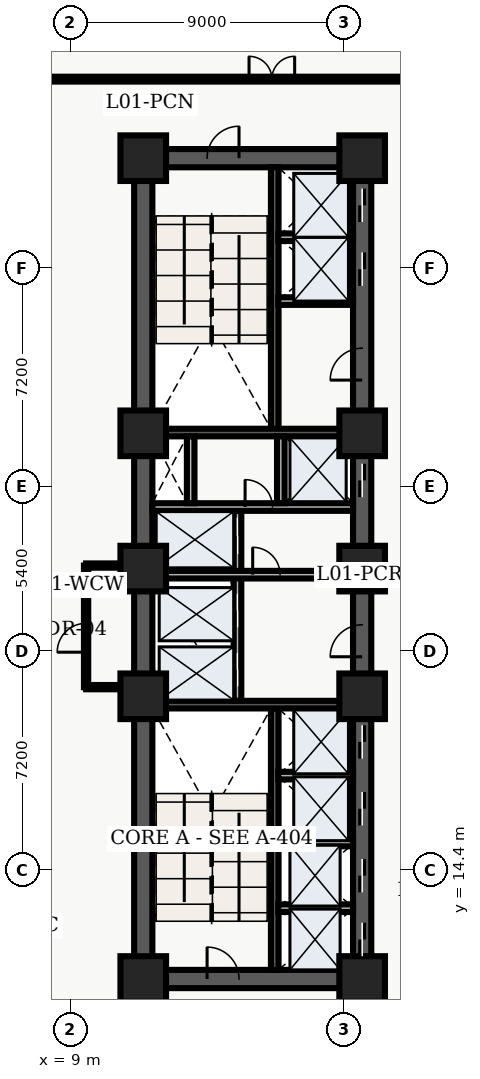
"""IFC4 building model, lengths in metres.
Left out: names, types, materials, properties, quantities, classifications, styles, units other than length and angle.
Written with IfcOpenShell. Run it as: python <this file> out.ifc"""

import sys

from ifc_helpers import new_model, entity, si_unit, converted_unit, direction, frame, origin_with_axes, origin_2d_with_axis, place, context, subcontext, project, spatial, polyline, rectangle, outline, extrude, element, fill, save


model = new_model("IFC4")
c1 = context("Model", 3, precision=1e-05, world=origin_with_axes(), true_north=direction((0.0, 1.0)))
c2 = subcontext(c1, "Body", "Model", "MODEL_VIEW")
j1 = project(units=[si_unit("LENGTHUNIT", "METRE"), converted_unit("PLANEANGLEUNIT", "DEGREE", entity("IfcPlaneAngleMeasure", 0.017), si_unit("PLANEANGLEUNIT", "RADIAN"), dimensions=[0, 0, 0, 0, 0, 0, 0])], contexts=[c1])
p1 = place(None, origin_with_axes())
s1 = spatial("IfcSite", under=j1, at=p1, CompositionType="ELEMENT")
p2 = place(p1, origin_with_axes())
s2 = spatial("IfcBuilding", under=s1, at=p2, CompositionType="ELEMENT")
p3 = place(p2, frame((0.0, 0.0, 5.7), z_axis=(0.0, 0.0, 1.0), x_axis=(1.0, 0.0, 0.0)))
s3 = spatial("IfcBuildingStorey", under=s2, at=p3, CompositionType="ELEMENT", Elevation=5.7)
p4 = place(p3, frame((11.4, 10.8, 0.0), z_axis=(0.0, 0.0, 1.0), x_axis=(0.0, 1.0, 0.0)))
e1 = element("IfcWall", 1, at=p4, inside=s3, PredefinedType="SHEAR", context=c2, shape_type="SweptSolid", body=[
    extrude(outline(polyline([(0.0, -0.3), (27.0, -0.3), (27.0, 0.3), (0.0, 0.3), (0.0, -0.3)])), origin_with_axes(), (0.0, 0.0, 1.0), 4.86),
])
p5 = place(p3, frame((11.4, 10.8, 0.0), z_axis=(0.0, 0.0, 1.0), x_axis=(1.0, 0.0, 0.0)))
e2 = element("IfcWall", 2, at=p5, inside=s3, PredefinedType="SHEAR", context=c2, shape_type="SweptSolid", body=[
    extrude(outline(polyline([(0.0, -0.3), (7.2, -0.3), (7.2, 0.3), (0.0, 0.3), (0.0, -0.3)])), origin_with_axes(), (0.0, 0.0, 1.0), 4.86),
])
p6 = place(p5, frame((2.625, 0.0, 0.0), z_axis=(0.0, 0.0, 1.0), x_axis=(1.0, 0.0, 0.0)))
e3 = element("IfcOpeningElement", 3, at=p6, cuts=e2, PredefinedType="OPENING", context=c2, shape_type="SweptSolid", body=[
    extrude(rectangle(XDim=1.05, YDim=0.62, at=origin_2d_with_axis()), origin_with_axes(), (0.0, 0.0, 1.0), 2.15),
])
p7 = place(p3, frame((11.4, 37.8, 0.0), z_axis=(0.0, 0.0, 1.0), x_axis=(1.0, 0.0, 0.0)))
e4 = element("IfcWall", 4, at=p7, inside=s3, PredefinedType="SHEAR", context=c2, shape_type="SweptSolid", body=[
    extrude(outline(polyline([(0.0, -0.3), (7.2, -0.3), (7.2, 0.3), (0.0, 0.3), (0.0, -0.3)])), origin_with_axes(), (0.0, 0.0, 1.0), 4.86),
])
p8 = place(p7, frame((2.625, 0.0, 0.0), z_axis=(0.0, 0.0, 1.0), x_axis=(1.0, 0.0, 0.0)))
e5 = element("IfcOpeningElement", 5, at=p8, cuts=e4, PredefinedType="OPENING", context=c2, shape_type="SweptSolid", body=[
    extrude(rectangle(XDim=1.05, YDim=0.62, at=origin_2d_with_axis()), origin_with_axes(), (0.0, 0.0, 1.0), 2.15),
])
p9 = place(p3, frame((18.6, 10.8, 0.0), z_axis=(0.0, 0.0, 1.0), x_axis=(0.0, 1.0, 0.0)))
e6 = element("IfcWall", 6, at=p9, inside=s3, PredefinedType="SHEAR", context=c2, shape_type="SweptSolid", body=[
    extrude(outline(polyline([(0.0, -0.3), (13.5, -0.3), (13.5, 0.3), (0.0, 0.3), (0.0, -0.3)])), origin_with_axes(), (0.0, 0.0, 1.0), 4.86),
])
p10 = place(p9, frame((1.3, 0.0, 0.0), z_axis=(0.0, 0.0, 1.0), x_axis=(1.0, 0.0, 0.0)))
e7 = element("IfcOpeningElement", 7, at=p10, cuts=e6, PredefinedType="OPENING", context=c2, shape_type="SweptSolid", body=[
    extrude(rectangle(XDim=1.1, YDim=0.62, at=origin_2d_with_axis()), origin_with_axes(), (0.0, 0.0, 1.0), 2.15),
])
p11 = place(p9, frame((3.4, 0.0, 0.0), z_axis=(0.0, 0.0, 1.0), x_axis=(1.0, 0.0, 0.0)))
e8 = element("IfcOpeningElement", 8, at=p11, cuts=e6, PredefinedType="OPENING", context=c2, shape_type="SweptSolid", body=[
    extrude(rectangle(XDim=1.1, YDim=0.62, at=origin_2d_with_axis()), origin_with_axes(), (0.0, 0.0, 1.0), 2.15),
])
p12 = place(p9, frame((5.6, 0.0, 0.0), z_axis=(0.0, 0.0, 1.0), x_axis=(1.0, 0.0, 0.0)))
e9 = element("IfcOpeningElement", 9, at=p12, cuts=e6, PredefinedType="OPENING", context=c2, shape_type="SweptSolid", body=[
    extrude(rectangle(XDim=1.1, YDim=0.62, at=origin_2d_with_axis()), origin_with_axes(), (0.0, 0.0, 1.0), 2.15),
])
p13 = place(p9, frame((7.8, 0.0, 0.0), z_axis=(0.0, 0.0, 1.0), x_axis=(1.0, 0.0, 0.0)))
e10 = element("IfcOpeningElement", 10, at=p13, cuts=e6, PredefinedType="OPENING", context=c2, shape_type="SweptSolid", body=[
    extrude(rectangle(XDim=1.1, YDim=0.62, at=origin_2d_with_axis()), origin_with_axes(), (0.0, 0.0, 1.0), 2.15),
])
p14 = place(p9, frame((11.125, 0.0, 0.0), z_axis=(0.0, 0.0, 1.0), x_axis=(1.0, 0.0, 0.0)))
e11 = element("IfcOpeningElement", 11, at=p14, cuts=e6, PredefinedType="OPENING", context=c2, shape_type="SweptSolid", body=[
    extrude(rectangle(XDim=1.05, YDim=0.62, at=origin_2d_with_axis()), origin_with_axes(), (0.0, 0.0, 1.0), 2.15),
])
p15 = place(p3, frame((18.6, 24.3, 0.0), z_axis=(0.0, 0.0, 1.0), x_axis=(0.0, 1.0, 0.0)))
e12 = element("IfcWall", 12, at=p15, inside=s3, PredefinedType="SHEAR", context=c2, shape_type="SweptSolid", body=[
    extrude(outline(polyline([(0.0, -0.3), (13.5, -0.3), (13.5, 0.3), (0.0, 0.3), (0.0, -0.3)])), origin_with_axes(), (0.0, 0.0, 1.0), 4.86),
])
p16 = place(p15, frame((9.85, 0.0, 0.0), z_axis=(0.0, 0.0, 1.0), x_axis=(1.0, 0.0, 0.0)))
e13 = element("IfcOpeningElement", 13, at=p16, cuts=e12, PredefinedType="OPENING", context=c2, shape_type="SweptSolid", body=[
    extrude(rectangle(XDim=1.1, YDim=0.62, at=origin_2d_with_axis()), origin_with_axes(), (0.0, 0.0, 1.0), 2.15),
])
p17 = place(p15, frame((11.95, 0.0, 0.0), z_axis=(0.0, 0.0, 1.0), x_axis=(1.0, 0.0, 0.0)))
e14 = element("IfcOpeningElement", 14, at=p17, cuts=e12, PredefinedType="OPENING", context=c2, shape_type="SweptSolid", body=[
    extrude(rectangle(XDim=1.1, YDim=0.62, at=origin_2d_with_axis()), origin_with_axes(), (0.0, 0.0, 1.0), 2.15),
])
p18 = place(p15, frame((2.9, 0.0, 0.0), z_axis=(0.0, 0.0, 1.0), x_axis=(1.0, 0.0, 0.0)))
e15 = element("IfcOpeningElement", 15, at=p18, cuts=e12, PredefinedType="OPENING", context=c2, shape_type="SweptSolid", body=[
    extrude(rectangle(XDim=1.1, YDim=0.62, at=origin_2d_with_axis()), origin_with_axes(), (0.0, 0.0, 1.0), 2.15),
])
p19 = place(p15, frame((6.725, 0.0, 0.0), z_axis=(0.0, 0.0, 1.0), x_axis=(1.0, 0.0, 0.0)))
e16 = element("IfcOpeningElement", 16, at=p19, cuts=e12, PredefinedType="OPENING", context=c2, shape_type="SweptSolid", body=[
    extrude(rectangle(XDim=1.05, YDim=0.62, at=origin_2d_with_axis()), origin_with_axes(), (0.0, 0.0, 1.0), 2.15),
])
p20 = place(p3, frame((15.725, 11.1, 0.0), z_axis=(0.0, 0.0, 1.0), x_axis=(0.0, 1.0, 0.0)))
e17 = element("IfcWall", 17, at=p20, inside=s3, PredefinedType="SHEAR", context=c2, shape_type="SweptSolid", body=[
    extrude(outline(polyline([(0.0, -0.125), (8.6, -0.125), (8.6, 0.125), (0.0, 0.125), (0.0, -0.125)])), origin_with_axes(), (0.0, 0.0, 1.0), 4.86),
])
p21 = place(p3, frame((11.7, 19.825, 0.0), z_axis=(0.0, 0.0, 1.0), x_axis=(1.0, 0.0, 0.0)))
e18 = element("IfcWall", 18, at=p21, inside=s3, PredefinedType="SHEAR", context=c2, shape_type="SweptSolid", body=[
    extrude(outline(polyline([(0.0, -0.125), (6.6, -0.125), (6.6, 0.125), (0.0, 0.125), (0.0, -0.125)])), origin_with_axes(), (0.0, 0.0, 1.0), 4.86),
])
p22 = place(p3, frame((15.725, 28.9, 0.0), z_axis=(0.0, 0.0, 1.0), x_axis=(0.0, 1.0, 0.0)))
e19 = element("IfcWall", 19, at=p22, inside=s3, PredefinedType="SHEAR", context=c2, shape_type="SweptSolid", body=[
    extrude(outline(polyline([(0.0, -0.125), (8.6, -0.125), (8.6, 0.125), (0.0, 0.125), (0.0, -0.125)])), origin_with_axes(), (0.0, 0.0, 1.0), 4.86),
])
p23 = place(p3, frame((11.7, 28.775, 0.0), z_axis=(0.0, 0.0, 1.0), x_axis=(1.0, 0.0, 0.0)))
e20 = element("IfcWall", 20, at=p23, inside=s3, PredefinedType="SHEAR", context=c2, shape_type="SweptSolid", body=[
    extrude(outline(polyline([(0.0, -0.125), (6.6, -0.125), (6.6, 0.125), (0.0, 0.125), (0.0, -0.125)])), origin_with_axes(), (0.0, 0.0, 1.0), 4.86),
])
p24 = place(p3, frame((14.5, 19.95, 0.0), z_axis=(0.0, 0.0, 1.0), x_axis=(0.0, 1.0, 0.0)))
e21 = element("IfcWall", 21, at=p24, inside=s3, PredefinedType="SOLIDWALL", context=c2, shape_type="SweptSolid", body=[
    extrude(outline(polyline([(0.0, -0.125), (6.25, -0.125), (6.25, 0.125), (0.0, 0.125), (0.0, -0.125)])), origin_with_axes(), (0.0, 0.0, 1.0), 3.6),
])
p25 = place(p24, frame((1.025, 0.0, 0.0), z_axis=(0.0, 0.0, 1.0), x_axis=(1.0, 0.0, 0.0)))
e22 = element("IfcOpeningElement", 22, at=p25, cuts=e21, PredefinedType="OPENING", context=c2, shape_type="SweptSolid", body=[
    extrude(rectangle(XDim=1.1, YDim=0.27, at=origin_2d_with_axis()), origin_with_axes(), (0.0, 0.0, 1.0), 2.15),
])
p26 = place(p24, frame((2.975, 0.0, 0.0), z_axis=(0.0, 0.0, 1.0), x_axis=(1.0, 0.0, 0.0)))
e23 = element("IfcOpeningElement", 23, at=p26, cuts=e21, PredefinedType="OPENING", context=c2, shape_type="SweptSolid", body=[
    extrude(rectangle(XDim=1.1, YDim=0.27, at=origin_2d_with_axis()), origin_with_axes(), (0.0, 0.0, 1.0), 2.15),
])
p27 = place(p24, frame((5.425, 0.0, 0.0), z_axis=(0.0, 0.0, 1.0), x_axis=(1.0, 0.0, 0.0)))
e24 = element("IfcOpeningElement", 24, at=p27, cuts=e21, PredefinedType="OPENING", context=c2, shape_type="SweptSolid", body=[
    extrude(rectangle(XDim=1.2, YDim=0.27, at=origin_2d_with_axis()), origin_with_axes(), (0.0, 0.0, 1.0), 2.15),
])
p28 = place(p3, frame((11.7, 24.1, 0.0), z_axis=(0.0, 0.0, 1.0), x_axis=(1.0, 0.0, 0.0)))
e25 = element("IfcWall", 25, at=p28, inside=s3, PredefinedType="SOLIDWALL", context=c2, shape_type="SweptSolid", body=[
    extrude(outline(polyline([(0.0, -0.125), (6.6, -0.125), (6.6, 0.125), (0.0, 0.125), (0.0, -0.125)])), origin_with_axes(), (0.0, 0.0, 1.0), 3.6),
])
p29 = place(p28, frame((3.75, 0.0, 0.0), z_axis=(0.0, 0.0, 1.0), x_axis=(1.0, 0.0, 0.0)))
e26 = element("IfcOpeningElement", 26, at=p29, cuts=e25, PredefinedType="OPENING", context=c2, shape_type="SweptSolid", body=[
    extrude(rectangle(XDim=0.9, YDim=0.27, at=origin_2d_with_axis()), origin_with_axes(), (0.0, 0.0, 1.0), 2.15),
])
p30 = place(p3, frame((11.7, 26.325, 0.0), z_axis=(0.0, 0.0, 1.0), x_axis=(1.0, 0.0, 0.0)))
e27 = element("IfcWall", 27, at=p30, inside=s3, PredefinedType="SOLIDWALL", context=c2, shape_type="SweptSolid", body=[
    extrude(outline(polyline([(0.0, -0.125), (6.6, -0.125), (6.6, 0.125), (0.0, 0.125), (0.0, -0.125)])), origin_with_axes(), (0.0, 0.0, 1.0), 3.6),
])
p31 = place(p30, frame((3.5, 0.0, 0.0), z_axis=(0.0, 0.0, 1.0), x_axis=(1.0, 0.0, 0.0)))
e28 = element("IfcOpeningElement", 28, at=p31, cuts=e27, PredefinedType="OPENING", context=c2, shape_type="SweptSolid", body=[
    extrude(rectangle(XDim=0.9, YDim=0.27, at=origin_2d_with_axis()), origin_with_axes(), (0.0, 0.0, 1.0), 2.15),
])
for number, where, z_axis, x_axis in (
    (29, (12.96, 26.45, 0.0), (0.0, 0.0, 1.0), (0.0, 1.0, 0.0)),
    (30, (15.925, 26.45, 0.0), (0.0, 0.0, 1.0), (0.0, 1.0, 0.0)),
):
    element("IfcWall", number, at=place(p3, frame(where, z_axis=z_axis, x_axis=x_axis)), inside=s3, PredefinedType="SOLIDWALL", context=c2, shape_type="SweptSolid", body=[
        extrude(outline(polyline([(0.0, -0.125), (2.2, -0.125), (2.2, 0.125), (0.0, 0.125), (0.0, -0.125)])), origin_with_axes(), (0.0, 0.0, 1.0), 3.6),
    ])
for number, where, z_axis, x_axis in (
    (31, (11.4, 10.8, 0.0), (0.0, 0.0, 1.0), (1.0, 0.0, 0.0)),
    (32, (11.4, 20.1, 0.0), (0.0, 0.0, 1.0), (1.0, 0.0, 0.0)),
    (33, (11.4, 24.3, 0.0), (0.0, 0.0, 1.0), (1.0, 0.0, 0.0)),
    (34, (11.4, 28.75, 0.0), (0.0, 0.0, 1.0), (1.0, 0.0, 0.0)),
    (35, (11.4, 37.8, 0.0), (0.0, 0.0, 1.0), (1.0, 0.0, 0.0)),
    (36, (18.6, 10.8, 0.0), (0.0, 0.0, 1.0), (1.0, 0.0, 0.0)),
    (37, (18.6, 20.1, 0.0), (0.0, 0.0, 1.0), (1.0, 0.0, 0.0)),
    (38, (18.6, 24.3, 0.0), (0.0, 0.0, 1.0), (1.0, 0.0, 0.0)),
    (39, (18.6, 28.75, 0.0), (0.0, 0.0, 1.0), (1.0, 0.0, 0.0)),
    (40, (18.6, 37.8, 0.0), (0.0, 0.0, 1.0), (1.0, 0.0, 0.0)),
):
    element("IfcColumn", number, at=place(p3, frame(where, z_axis=z_axis, x_axis=x_axis)), inside=s3, PredefinedType="COLUMN", context=c2, shape_type="SweptSolid", body=[
        extrude(rectangle(XDim=1.5, YDim=1.5, at=origin_2d_with_axis()), origin_with_axes(), (0.0, 0.0, 1.0), 5.1),
    ])
for number, where, z_axis, x_axis in (
    (41, (15.84, 13.13, 0.0), (0.0, 0.0, 1.0), (1.0, 0.0, 0.0)),
    (42, (15.84, 15.29, 0.0), (0.0, 0.0, 1.0), (1.0, 0.0, 0.0)),
    (43, (15.84, 17.49, 0.0), (0.0, 0.0, 1.0), (1.0, 0.0, 0.0)),
    (44, (15.84, 33.1, 0.0), (0.0, 0.0, 1.0), (1.0, 0.0, 0.0)),
    (45, (15.84, 35.2, 0.0), (0.0, 0.0, 1.0), (1.0, 0.0, 0.0)),
):
    element("IfcWall", number, at=place(p3, frame(where, z_axis=z_axis, x_axis=x_axis)), inside=s3, PredefinedType="SOLIDWALL", context=c2, shape_type="SweptSolid", body=[
        extrude(outline(polyline([(0.0, -0.125), (2.46, -0.125), (2.46, 0.125), (0.0, 0.125), (0.0, -0.125)])), origin_with_axes(), (0.0, 0.0, 1.0), 3.2),
    ])
p32 = place(p3, frame((9.52, 20.4, 0.0), z_axis=(0.0, 0.0, 1.0), x_axis=(0.0, 1.0, 0.0)))
e46 = element("IfcWall", 46, at=p32, inside=s3, PredefinedType="PARTITIONING", context=c2, shape_type="SweptSolid", body=[
    extrude(outline(polyline([(0.0, -0.07), (4.0, -0.07), (4.0, 0.07), (0.0, 0.07), (0.0, -0.07)])), origin_with_axes(), (0.0, 0.0, 1.0), 3.2),
])
p33 = place(p32, frame((1.625, 0.0, 0.0), z_axis=(0.0, 0.0, 1.0), x_axis=(1.0, 0.0, 0.0)))
e47 = element("IfcOpeningElement", 47, at=p33, cuts=e46, PredefinedType="OPENING", context=c2, shape_type="SweptSolid", body=[
    extrude(rectangle(XDim=0.95, YDim=0.16, at=origin_2d_with_axis()), origin_with_axes(), (0.0, 0.0, 1.0), 2.15),
])
for number, where, z_axis, x_axis in (
    (48, (9.52, 20.4, 0.0), (0.0, 0.0, 1.0), (1.0, 0.0, 0.0)),
    (49, (9.52, 24.4, 0.0), (0.0, 0.0, 1.0), (1.0, 0.0, 0.0)),
):
    element("IfcWall", number, at=place(p3, frame(where, z_axis=z_axis, x_axis=x_axis)), inside=s3, PredefinedType="PARTITIONING", context=c2, shape_type="SweptSolid", body=[
        extrude(outline(polyline([(0.0, -0.07), (1.58, -0.07), (1.58, 0.07), (0.0, 0.07), (0.0, -0.07)])), origin_with_axes(), (0.0, 0.0, 1.0), 3.2),
    ])
p34 = place(p3, frame((0.38, 40.4, 0.0), z_axis=(0.0, 0.0, 1.0), x_axis=(1.0, 0.0, 0.0)))
e50 = element("IfcWall", 50, at=p34, inside=s3, PredefinedType="PARTITIONING", context=c2, shape_type="SweptSolid", body=[
    extrude(outline(polyline([(0.0, -0.08), (20.92, -0.08), (20.92, 0.08), (0.0, 0.08), (0.0, -0.08)])), origin_with_axes(), (0.0, 0.0, 1.0), 3.2),
])
p35 = place(p34, frame((15.25, 0.0, 0.0), z_axis=(0.0, 0.0, 1.0), x_axis=(1.0, 0.0, 0.0)))
e51 = element("IfcOpeningElement", 51, at=p35, cuts=e50, PredefinedType="OPENING", context=c2, shape_type="SweptSolid", body=[
    extrude(rectangle(XDim=1.5, YDim=0.18, at=origin_2d_with_axis()), origin_with_axes(), (0.0, 0.0, 1.0), 2.2),
])
p36 = place(p9, frame((1.3, 0.0, 0.0), z_axis=(0.0, 0.0, 1.0), x_axis=(1.0, 0.0, 0.0)))
e52 = element("IfcDoor", 52, at=p36, inside=s3, OperationType="SLIDING_TO_LEFT", PredefinedType="DOOR", context=c2, shape_type="SweptSolid", body=[
    extrude(rectangle(XDim=1.1, YDim=0.09, at=origin_2d_with_axis()), origin_with_axes(), (0.0, 0.0, 1.0), 2.15),
])
fill(e7, e52)
p37 = place(p9, frame((3.4, 0.0, 0.0), z_axis=(0.0, 0.0, 1.0), x_axis=(1.0, 0.0, 0.0)))
e53 = element("IfcDoor", 53, at=p37, inside=s3, OperationType="SLIDING_TO_RIGHT", PredefinedType="DOOR", context=c2, shape_type="SweptSolid", body=[
    extrude(rectangle(XDim=1.1, YDim=0.09, at=origin_2d_with_axis()), origin_with_axes(), (0.0, 0.0, 1.0), 2.15),
])
fill(e8, e53)
p38 = place(p9, frame((5.6, 0.0, 0.0), z_axis=(0.0, 0.0, 1.0), x_axis=(1.0, 0.0, 0.0)))
e54 = element("IfcDoor", 54, at=p38, inside=s3, OperationType="DOUBLE_DOOR_SLIDING", PredefinedType="DOOR", context=c2, shape_type="SweptSolid", body=[
    extrude(rectangle(XDim=1.1, YDim=0.09, at=origin_2d_with_axis()), origin_with_axes(), (0.0, 0.0, 1.0), 2.15),
])
fill(e9, e54)
p39 = place(p9, frame((7.8, 0.0, 0.0), z_axis=(0.0, 0.0, 1.0), x_axis=(1.0, 0.0, 0.0)))
e55 = element("IfcDoor", 55, at=p39, inside=s3, OperationType="DOUBLE_DOOR_SLIDING", PredefinedType="DOOR", context=c2, shape_type="SweptSolid", body=[
    extrude(rectangle(XDim=1.1, YDim=0.09, at=origin_2d_with_axis()), origin_with_axes(), (0.0, 0.0, 1.0), 2.15),
])
fill(e10, e55)
p40 = place(p15, frame((9.85, 0.0, 0.0), z_axis=(0.0, 0.0, 1.0), x_axis=(1.0, 0.0, 0.0)))
e56 = element("IfcDoor", 56, at=p40, inside=s3, OperationType="DOUBLE_DOOR_SLIDING", PredefinedType="DOOR", context=c2, shape_type="SweptSolid", body=[
    extrude(rectangle(XDim=1.1, YDim=0.09, at=origin_2d_with_axis()), origin_with_axes(), (0.0, 0.0, 1.0), 2.15),
])
fill(e13, e56)
p41 = place(p15, frame((11.95, 0.0, 0.0), z_axis=(0.0, 0.0, 1.0), x_axis=(1.0, 0.0, 0.0)))
e57 = element("IfcDoor", 57, at=p41, inside=s3, OperationType="DOUBLE_DOOR_SLIDING", PredefinedType="DOOR", context=c2, shape_type="SweptSolid", body=[
    extrude(rectangle(XDim=1.1, YDim=0.09, at=origin_2d_with_axis()), origin_with_axes(), (0.0, 0.0, 1.0), 2.15),
])
fill(e14, e57)
p42 = place(p15, frame((2.9, 0.0, 0.0), z_axis=(0.0, 0.0, 1.0), x_axis=(1.0, 0.0, 0.0)))
e58 = element("IfcDoor", 58, at=p42, inside=s3, OperationType="DOUBLE_DOOR_SLIDING", PredefinedType="DOOR", context=c2, shape_type="SweptSolid", body=[
    extrude(rectangle(XDim=1.1, YDim=0.09, at=origin_2d_with_axis()), origin_with_axes(), (0.0, 0.0, 1.0), 2.15),
])
fill(e15, e58)
p43 = place(p24, frame((1.025, 0.0, 0.0), z_axis=(0.0, 0.0, 1.0), x_axis=(1.0, 0.0, 0.0)))
e59 = element("IfcDoor", 59, at=p43, inside=s3, OperationType="SLIDING_TO_LEFT", PredefinedType="DOOR", context=c2, shape_type="SweptSolid", body=[
    extrude(rectangle(XDim=1.1, YDim=0.09, at=origin_2d_with_axis()), origin_with_axes(), (0.0, 0.0, 1.0), 2.15),
])
fill(e22, e59)
p44 = place(p24, frame((2.975, 0.0, 0.0), z_axis=(0.0, 0.0, 1.0), x_axis=(1.0, 0.0, 0.0)))
e60 = element("IfcDoor", 60, at=p44, inside=s3, OperationType="SLIDING_TO_RIGHT", PredefinedType="DOOR", context=c2, shape_type="SweptSolid", body=[
    extrude(rectangle(XDim=1.1, YDim=0.09, at=origin_2d_with_axis()), origin_with_axes(), (0.0, 0.0, 1.0), 2.15),
])
fill(e23, e60)
p45 = place(p24, frame((5.425, 0.0, 0.0), z_axis=(0.0, 0.0, 1.0), x_axis=(1.0, 0.0, 0.0)))
e61 = element("IfcDoor", 61, at=p45, inside=s3, OperationType="DOUBLE_DOOR_SLIDING", PredefinedType="DOOR", context=c2, shape_type="SweptSolid", body=[
    extrude(rectangle(XDim=1.2, YDim=0.09, at=origin_2d_with_axis()), origin_with_axes(), (0.0, 0.0, 1.0), 2.15),
])
fill(e24, e61)
p46 = place(p5, frame((2.625, 0.0, 0.0), z_axis=(0.0, 0.0, 1.0), x_axis=(1.0, 0.0, 0.0)))
e62 = element("IfcDoor", 62, at=p46, inside=s3, OperationType="SINGLE_SWING_LEFT", PredefinedType="DOOR", context=c2, shape_type="SweptSolid", body=[
    extrude(rectangle(XDim=1.05, YDim=0.09, at=origin_2d_with_axis()), origin_with_axes(), (0.0, 0.0, 1.0), 2.15),
])
fill(e3, e62)
p47 = place(p7, frame((2.625, 0.0, 0.0), z_axis=(0.0, 0.0, 1.0), x_axis=(1.0, 0.0, 0.0)))
e63 = element("IfcDoor", 63, at=p47, inside=s3, OperationType="SINGLE_SWING_RIGHT", PredefinedType="DOOR", context=c2, shape_type="SweptSolid", body=[
    extrude(rectangle(XDim=1.05, YDim=0.09, at=origin_2d_with_axis()), origin_with_axes(), (0.0, 0.0, 1.0), 2.15),
])
fill(e5, e63)
p48 = place(p9, frame((11.125, 0.0, 0.0), z_axis=(0.0, 0.0, 1.0), x_axis=(1.0, 0.0, 0.0)))
e64 = element("IfcDoor", 64, at=p48, inside=s3, OperationType="SINGLE_SWING_LEFT", PredefinedType="DOOR", context=c2, shape_type="SweptSolid", body=[
    extrude(rectangle(XDim=1.05, YDim=0.09, at=origin_2d_with_axis()), origin_with_axes(), (0.0, 0.0, 1.0), 2.15),
])
fill(e11, e64)
p49 = place(p28, frame((3.75, 0.0, 0.0), z_axis=(0.0, 0.0, 1.0), x_axis=(1.0, 0.0, 0.0)))
e65 = element("IfcDoor", 65, at=p49, inside=s3, OperationType="SINGLE_SWING_LEFT", PredefinedType="DOOR", context=c2, shape_type="SweptSolid", body=[
    extrude(rectangle(XDim=0.9, YDim=0.09, at=origin_2d_with_axis()), origin_with_axes(), (0.0, 0.0, 1.0), 2.15),
])
fill(e26, e65)
p50 = place(p30, frame((3.5, 0.0, 0.0), z_axis=(0.0, 0.0, 1.0), x_axis=(1.0, 0.0, 0.0)))
e66 = element("IfcDoor", 66, at=p50, inside=s3, OperationType="SINGLE_SWING_LEFT", PredefinedType="DOOR", context=c2, shape_type="SweptSolid", body=[
    extrude(rectangle(XDim=0.9, YDim=0.09, at=origin_2d_with_axis()), origin_with_axes(), (0.0, 0.0, 1.0), 2.15),
])
fill(e28, e66)
p51 = place(p15, frame((6.725, 0.0, 0.0), z_axis=(0.0, 0.0, 1.0), x_axis=(1.0, 0.0, 0.0)))
e67 = element("IfcDoor", 67, at=p51, inside=s3, OperationType="SINGLE_SWING_LEFT", PredefinedType="DOOR", context=c2, shape_type="SweptSolid", body=[
    extrude(rectangle(XDim=1.05, YDim=0.09, at=origin_2d_with_axis()), origin_with_axes(), (0.0, 0.0, 1.0), 2.15),
])
fill(e16, e67)
p52 = place(p32, frame((1.625, 0.0, 0.0), z_axis=(0.0, 0.0, 1.0), x_axis=(1.0, 0.0, 0.0)))
e68 = element("IfcDoor", 68, at=p52, inside=s3, OperationType="SINGLE_SWING_LEFT", PredefinedType="DOOR", context=c2, shape_type="SweptSolid", body=[
    extrude(rectangle(XDim=0.95, YDim=0.084, at=origin_2d_with_axis()), origin_with_axes(), (0.0, 0.0, 1.0), 2.15),
])
fill(e47, e68)
p53 = place(p34, frame((15.25, 0.0, 0.0), z_axis=(0.0, 0.0, 1.0), x_axis=(1.0, 0.0, 0.0)))
e69 = element("IfcDoor", 69, at=p53, inside=s3, OperationType="DOUBLE_DOOR_SINGLE_SWING", PredefinedType="DOOR", context=c2, shape_type="SweptSolid", body=[
    extrude(rectangle(XDim=1.5, YDim=0.09, at=origin_2d_with_axis()), origin_with_axes(), (0.0, 0.0, 1.0), 2.2),
])
fill(e51, e69)
save(model, sys.argv[1])
